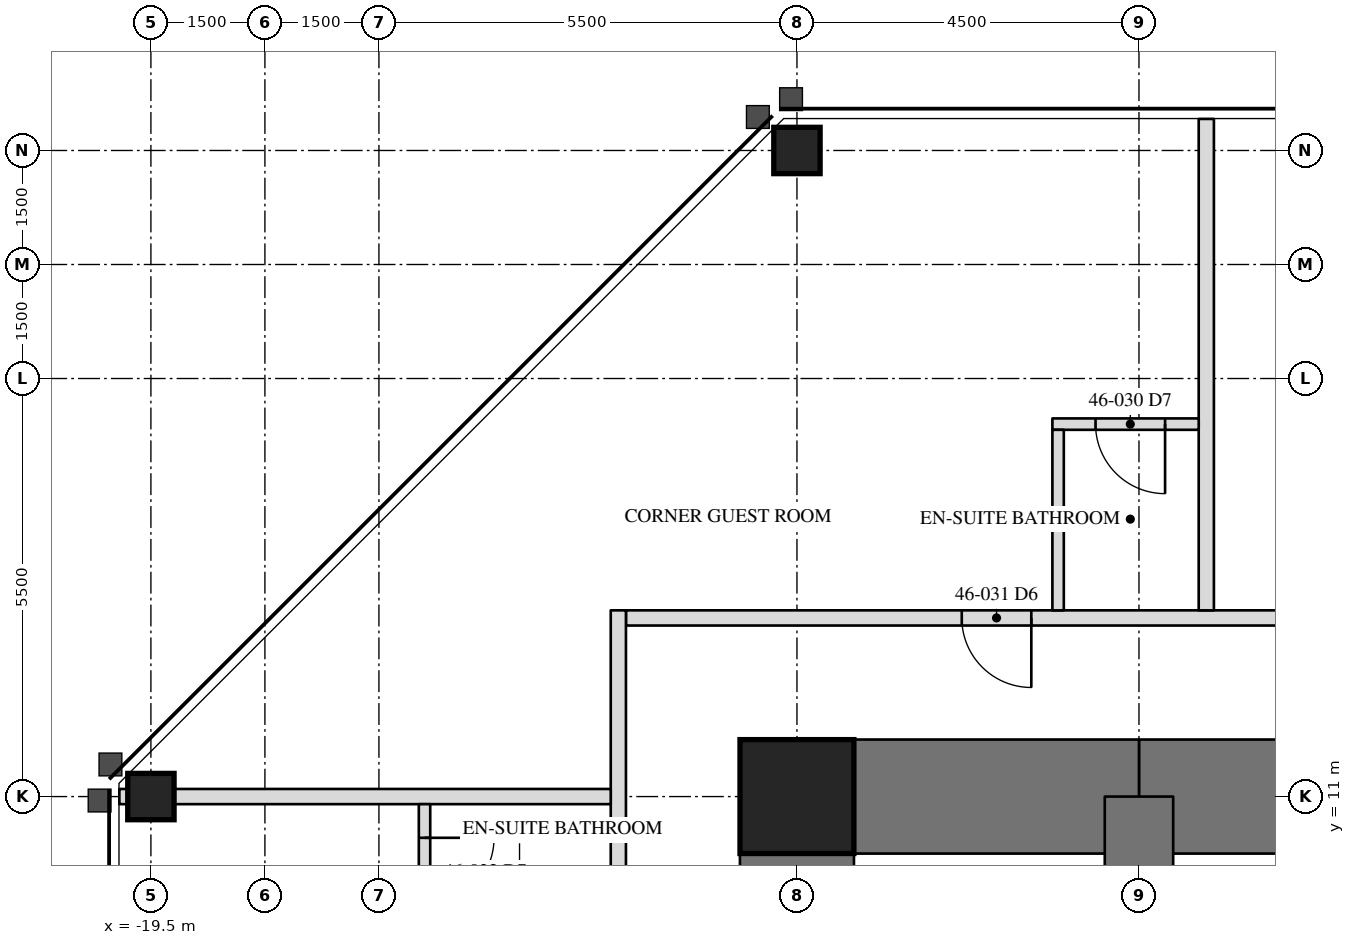
"""IFC4 building model, lengths in metres.
Left out: names, types, materials, properties, quantities, classifications, styles, units other than length and angle.
Written with IfcOpenShell. Run it as: python <this file> out.ifc"""

import sys

from ifc_helpers import new_model, si_unit, direction, frame, frame_2d, origin, origin_2d, place, context, subcontext, project, spatial, rectangle, hollow_rectangle, extrude, element, fill, save


model = new_model("IFC4")
c1 = context("Model", 3, precision=1e-05, world=origin(), true_north=direction((0.0, 1.0)))
c2 = subcontext(c1, "Body", "Model", "MODEL_VIEW")
j1 = project(units=[si_unit("LENGTHUNIT", "METRE"), si_unit("PLANEANGLEUNIT", "RADIAN")], contexts=[c1])
p1 = place(None, origin())
s1 = spatial("IfcSite", under=j1, at=p1, CompositionType="ELEMENT")
p2 = place(p1, origin())
s2 = spatial("IfcBuilding", under=s1, at=p2, CompositionType="ELEMENT")
p3 = place(p2, frame((0.0, 0.0, 197.7)))
s3 = spatial("IfcBuildingStorey", under=s2, at=p3, CompositionType="ELEMENT", Elevation=197.7)
for number, where, z_axis, x_axis in (
    (1, (-11.0, 19.5, 0.0), (0.0, 0.0, 1.0), (1.0, 0.0, 0.0)),
    (2, (-19.5, 11.0, 0.0), (0.0, 0.0, 1.0), (0.0, 1.0, 0.0)),
):
    element("IfcColumn", number, at=place(p3, frame(where, z_axis=z_axis, x_axis=x_axis)), inside=s3, PredefinedType="COLUMN", context=c2, shape_type="SweptSolid", body=[
        extrude(hollow_rectangle(XDim=0.61, YDim=0.61, WallThickness=0.076, at=origin_2d()), origin(), (0.0, 0.0, 1.0), 3.5),
    ])
p4 = place(p3, frame((-11.0, 11.0, 0.0), z_axis=(0.0, 0.0, 1.0), x_axis=(0.0, -1.0, 0.0)))
e3 = element("IfcWall", 3, at=p4, inside=s3, PredefinedType="SHEAR", context=c2, shape_type="SweptSolid", body=[
    extrude(rectangle(XDim=22.0, YDim=1.5, at=frame_2d((11.0, 0.0))), origin(), (0.0, 0.0, 1.0), 3.5),
])
p5 = place(p4, frame((15.393, 0.0, 0.0)))
e4 = element("IfcOpeningElement", 4, at=p5, cuts=e3, PredefinedType="OPENING", context=c2, shape_type="SweptSolid", body=[
    extrude(rectangle(XDim=0.915, YDim=2.134, at=frame_2d((0.458, 1.067))), frame((0.0, 0.76, 0.0), z_axis=(0.0, -1.0, 0.0), x_axis=(1.0, 0.0, 0.0)), (0.0, 0.0, 1.0), 1.52),
])
p6 = place(p3, frame((6.5, 11.0, 0.0), z_axis=(0.0, 0.0, 1.0), x_axis=(-1.0, 0.0, 0.0)))
e5 = element("IfcWall", 5, at=p6, inside=s3, PredefinedType="SHEAR", context=c2, shape_type="SweptSolid", body=[
    extrude(rectangle(XDim=13.0, YDim=1.5, at=frame_2d((6.5, 0.0))), origin(), (0.0, 0.0, 1.0), 3.5),
])
p7 = place(p6, frame((6.042, 0.0, 0.0)))
e6 = element("IfcOpeningElement", 6, at=p7, cuts=e5, PredefinedType="OPENING", context=c2, shape_type="SweptSolid", body=[
    extrude(rectangle(XDim=0.915, YDim=2.134, at=frame_2d((0.458, 1.067))), frame((0.0, 0.76, 0.0), z_axis=(0.0, -1.0, 0.0), x_axis=(1.0, 0.0, 0.0)), (0.0, 0.0, 1.0), 1.52),
])
p8 = place(p3, frame((-6.5, 11.0, 0.0), z_axis=(0.0, 0.0, 1.0), x_axis=(-1.0, 0.0, 0.0)))
e7 = element("IfcWall", 7, at=p8, inside=s3, PredefinedType="SHEAR", context=c2, shape_type="SweptSolid", body=[
    extrude(rectangle(XDim=4.5, YDim=1.5, at=frame_2d((2.25, 0.0))), origin(), (0.0, 0.0, 1.0), 3.5),
])
p9 = place(p3, frame((-6.5, 11.0, 0.0), z_axis=(0.0, 0.0, 1.0), x_axis=(0.0, -1.0, 0.0)))
e8 = element("IfcWall", 8, at=p9, inside=s3, PredefinedType="SHEAR", context=c2, shape_type="SweptSolid", body=[
    extrude(rectangle(XDim=4.5, YDim=0.9, at=frame_2d((2.25, 0.0))), origin(), (0.0, 0.0, 1.0), 3.5),
])
p10 = place(p3, frame((-11.0, 11.0, 0.0), z_axis=(0.0, 0.0, 1.0), x_axis=(1.0, 0.0, 0.0)))
e9 = element("IfcColumn", 9, at=p10, inside=s3, PredefinedType="COLUMN", context=c2, shape_type="SweptSolid", body=[
    extrude(hollow_rectangle(XDim=1.499, YDim=1.499, WallThickness=0.102, at=origin_2d()), origin(), (0.0, 0.0, 1.0), 3.5),
])
p11 = place(p3, frame((13.45, 13.35, 0.0), z_axis=(0.0, 0.0, 1.0), x_axis=(-1.0, 0.0, 0.0)))
e10 = element("IfcWall", 10, at=p11, inside=s3, PredefinedType="PARTITIONING", context=c2, shape_type="SweptSolid", body=[
    extrude(rectangle(XDim=26.7, YDim=0.2, at=frame_2d((13.35, 0.0))), origin(), (0.0, 0.0, 1.0), 3.31),
])
p12 = place(p11, frame((4.752, 0.0, 0.0)))
e11 = element("IfcOpeningElement", 11, at=p12, cuts=e10, PredefinedType="OPENING", context=c2, shape_type="SweptSolid", body=[
    extrude(rectangle(XDim=0.915, YDim=2.134, at=frame_2d((0.458, 1.067))), frame((0.0, 0.11, 0.0), z_axis=(0.0, -1.0, 0.0), x_axis=(1.0, 0.0, 0.0)), (0.0, 0.0, 1.0), 0.22),
])
p13 = place(p11, frame((10.204, 0.0, 0.0)))
e12 = element("IfcOpeningElement", 12, at=p13, cuts=e10, PredefinedType="OPENING", context=c2, shape_type="SweptSolid", body=[
    extrude(rectangle(XDim=0.915, YDim=2.134, at=frame_2d((0.458, 1.067))), frame((0.0, 0.11, 0.0), z_axis=(0.0, -1.0, 0.0), x_axis=(1.0, 0.0, 0.0)), (0.0, 0.0, 1.0), 0.22),
])
p14 = place(p11, frame((15.752, 0.0, 0.0)))
e13 = element("IfcOpeningElement", 13, at=p14, cuts=e10, PredefinedType="OPENING", context=c2, shape_type="SweptSolid", body=[
    extrude(rectangle(XDim=0.915, YDim=2.134, at=frame_2d((0.458, 1.067))), frame((0.0, 0.11, 0.0), z_axis=(0.0, -1.0, 0.0), x_axis=(1.0, 0.0, 0.0)), (0.0, 0.0, 1.0), 0.22),
])
p15 = place(p11, frame((21.366, 0.0, 0.0)))
e14 = element("IfcOpeningElement", 14, at=p15, cuts=e10, PredefinedType="OPENING", context=c2, shape_type="SweptSolid", body=[
    extrude(rectangle(XDim=0.915, YDim=2.134, at=frame_2d((0.458, 1.067))), frame((0.0, 0.11, 0.0), z_axis=(0.0, -1.0, 0.0), x_axis=(1.0, 0.0, 0.0)), (0.0, 0.0, 1.0), 0.22),
])
p16 = place(p3, frame((-13.35, 13.45, 0.0), z_axis=(0.0, 0.0, 1.0), x_axis=(0.0, -1.0, 0.0)))
e15 = element("IfcWall", 15, at=p16, inside=s3, PredefinedType="PARTITIONING", context=c2, shape_type="SweptSolid", body=[
    extrude(rectangle(XDim=26.7, YDim=0.2, at=frame_2d((13.35, 0.0))), origin(), (0.0, 0.0, 1.0), 3.31),
])
p17 = place(p16, frame((4.752, 0.0, 0.0)))
e16 = element("IfcOpeningElement", 16, at=p17, cuts=e15, PredefinedType="OPENING", context=c2, shape_type="SweptSolid", body=[
    extrude(rectangle(XDim=0.915, YDim=2.134, at=frame_2d((0.458, 1.067))), frame((0.0, 0.11, 0.0), z_axis=(0.0, -1.0, 0.0), x_axis=(1.0, 0.0, 0.0)), (0.0, 0.0, 1.0), 0.22),
])
p18 = place(p16, frame((10.204, 0.0, 0.0)))
e17 = element("IfcOpeningElement", 17, at=p18, cuts=e15, PredefinedType="OPENING", context=c2, shape_type="SweptSolid", body=[
    extrude(rectangle(XDim=0.915, YDim=2.134, at=frame_2d((0.458, 1.067))), frame((0.0, 0.11, 0.0), z_axis=(0.0, -1.0, 0.0), x_axis=(1.0, 0.0, 0.0)), (0.0, 0.0, 1.0), 0.22),
])
p19 = place(p16, frame((15.752, 0.0, 0.0)))
e18 = element("IfcOpeningElement", 18, at=p19, cuts=e15, PredefinedType="OPENING", context=c2, shape_type="SweptSolid", body=[
    extrude(rectangle(XDim=0.915, YDim=2.134, at=frame_2d((0.458, 1.067))), frame((0.0, 0.11, 0.0), z_axis=(0.0, -1.0, 0.0), x_axis=(1.0, 0.0, 0.0)), (0.0, 0.0, 1.0), 0.22),
])
p20 = place(p16, frame((21.366, 0.0, 0.0)))
e19 = element("IfcOpeningElement", 19, at=p20, cuts=e15, PredefinedType="OPENING", context=c2, shape_type="SweptSolid", body=[
    extrude(rectangle(XDim=0.915, YDim=2.134, at=frame_2d((0.458, 1.067))), frame((0.0, 0.11, 0.0), z_axis=(0.0, -1.0, 0.0), x_axis=(1.0, 0.0, 0.0)), (0.0, 0.0, 1.0), 0.22),
])
p21 = place(p3, frame((-5.614, 13.45, 0.0), z_axis=(0.0, 0.0, 1.0), x_axis=(0.0, 1.0, 0.0)))
e20 = element("IfcWall", 20, at=p21, inside=s3, PredefinedType="PARTITIONING", context=c2, shape_type="SweptSolid", body=[
    extrude(rectangle(XDim=6.465, YDim=0.2, at=frame_2d((3.232, 0.0))), origin(), (0.0, 0.0, 1.0), 3.31),
])
p22 = place(p3, frame((-5.714, 15.9, 0.0), z_axis=(0.0, 0.0, 1.0), x_axis=(-1.0, 0.0, 0.0)))
e21 = element("IfcWall", 21, at=p22, inside=s3, PredefinedType="PARTITIONING", context=c2, shape_type="SweptSolid", body=[
    extrude(rectangle(XDim=1.925, YDim=0.15, at=frame_2d((0.962, 0.0))), origin(), (0.0, 0.0, 1.0), 3.31),
])
p23 = place(p22, frame((0.442, 0.0, 0.0)))
e22 = element("IfcOpeningElement", 22, at=p23, cuts=e21, PredefinedType="OPENING", context=c2, shape_type="SweptSolid", body=[
    extrude(rectangle(XDim=0.915, YDim=2.032, at=frame_2d((0.458, 1.016))), frame((0.0, 0.085, 0.0), z_axis=(0.0, -1.0, 0.0), x_axis=(1.0, 0.0, 0.0)), (0.0, 0.0, 1.0), 0.17),
])
p24 = place(p3, frame((-7.564, 13.45, 0.0), z_axis=(0.0, 0.0, 1.0), x_axis=(0.0, 1.0, 0.0)))
e23 = element("IfcWall", 23, at=p24, inside=s3, PredefinedType="PARTITIONING", context=c2, shape_type="SweptSolid", body=[
    extrude(rectangle(XDim=2.375, YDim=0.15, at=frame_2d((1.188, 0.0))), origin(), (0.0, 0.0, 1.0), 3.31),
])
p25 = place(p3, frame((-13.45, 11.0, 0.0), z_axis=(0.0, 0.0, 1.0), x_axis=(-1.0, 0.0, 0.0)))
e24 = element("IfcWall", 24, at=p25, inside=s3, PredefinedType="PARTITIONING", context=c2, shape_type="SweptSolid", body=[
    extrude(rectangle(XDim=6.465, YDim=0.2, at=frame_2d((3.232, 0.0))), origin(), (0.0, 0.0, 1.0), 2.802),
])
p26 = place(p3, frame((-15.9, 10.9, 0.0), z_axis=(0.0, 0.0, 1.0), x_axis=(0.0, -1.0, 0.0)))
e25 = element("IfcWall", 25, at=p26, inside=s3, PredefinedType="PARTITIONING", context=c2, shape_type="SweptSolid", body=[
    extrude(rectangle(XDim=1.925, YDim=0.15, at=frame_2d((0.962, 0.0))), origin(), (0.0, 0.0, 1.0), 3.31),
])
p27 = place(p26, frame((0.442, 0.0, 0.0)))
e26 = element("IfcOpeningElement", 26, at=p27, cuts=e25, PredefinedType="OPENING", context=c2, shape_type="SweptSolid", body=[
    extrude(rectangle(XDim=0.915, YDim=2.032, at=frame_2d((0.458, 1.016))), frame((0.0, 0.085, 0.0), z_axis=(0.0, -1.0, 0.0), x_axis=(1.0, 0.0, 0.0)), (0.0, 0.0, 1.0), 0.17),
])
p28 = place(p23, origin())
e27 = element("IfcDoor", 27, at=p28, inside=s3, OperationType="SINGLE_SWING_LEFT", PredefinedType="DOOR", context=c2, shape_type="SweptSolid", body=[
    extrude(rectangle(XDim=0.915, YDim=2.032, at=frame_2d((0.458, 1.016))), frame((0.0, 0.025, 0.0), z_axis=(0.0, -1.0, 0.0), x_axis=(1.0, 0.0, 0.0)), (0.0, 0.0, 1.0), 0.05),
])
fill(e22, e27)
p29 = place(p15, origin())
e28 = element("IfcDoor", 28, at=p29, inside=s3, OperationType="SINGLE_SWING_LEFT", PredefinedType="DOOR", context=c2, shape_type="SweptSolid", body=[
    extrude(rectangle(XDim=0.915, YDim=2.134, at=frame_2d((0.458, 1.067))), frame((0.0, 0.025, 0.0), z_axis=(0.0, -1.0, 0.0), x_axis=(1.0, 0.0, 0.0)), (0.0, 0.0, 1.0), 0.05),
])
fill(e14, e28)
p30 = place(p27, origin())
e29 = element("IfcDoor", 29, at=p30, inside=s3, OperationType="SINGLE_SWING_LEFT", PredefinedType="DOOR", context=c2, shape_type="SweptSolid", body=[
    extrude(rectangle(XDim=0.915, YDim=2.032, at=frame_2d((0.458, 1.016))), frame((0.0, 0.025, 0.0), z_axis=(0.0, -1.0, 0.0), x_axis=(1.0, 0.0, 0.0)), (0.0, 0.0, 1.0), 0.05),
])
fill(e26, e29)
save(model, sys.argv[1])
